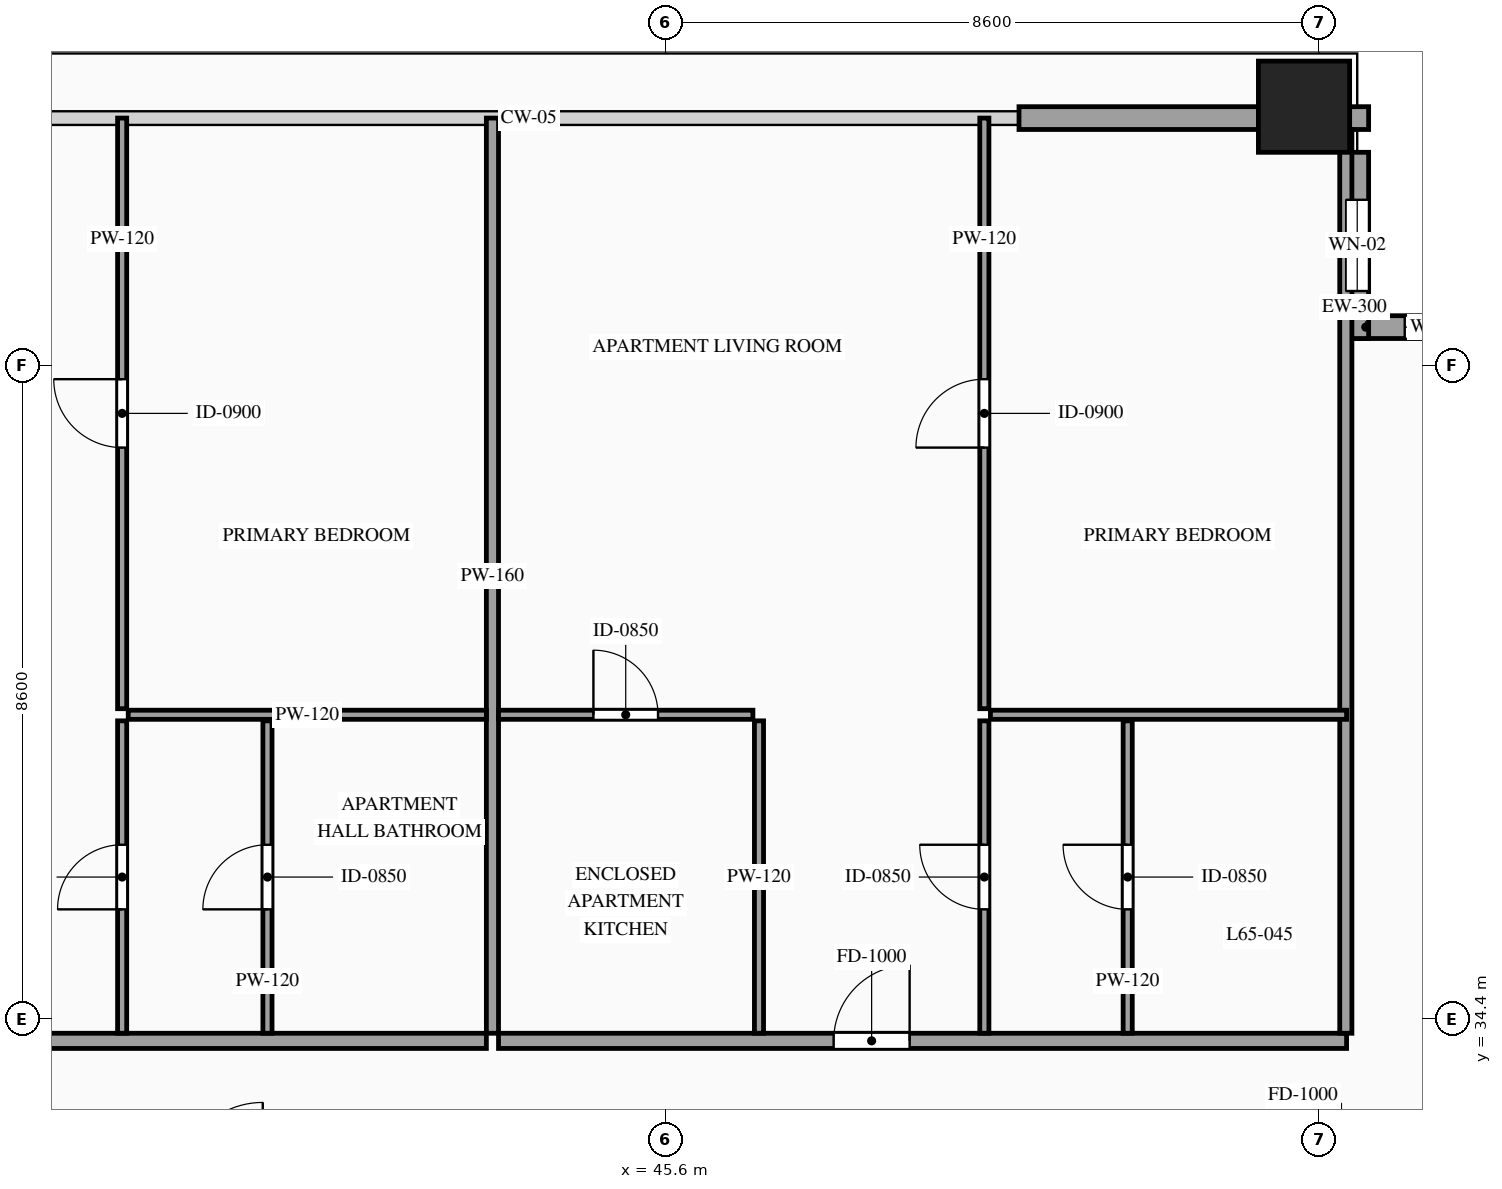
"""IFC4 building model, lengths in metres.
Left out: names, types, materials, properties, quantities, classifications, styles, units other than length and angle.
Written with IfcOpenShell. Run it as: python <this file> out.ifc"""

import sys

from ifc_helpers import new_model, si_unit, direction, frame, frame_2d, origin, origin_2d, place, context, subcontext, project, spatial, rectangle, hollow_rectangle, extrude, source, transform, mapped, element, fill, save


model = new_model("IFC4")
c1 = context("Model", 3, precision=1e-05, world=origin(), true_north=direction((0.0, 1.0)))
c2 = subcontext(c1, "Body", "Model", "MODEL_VIEW")
j1 = project(units=[si_unit("LENGTHUNIT", "METRE"), si_unit("PLANEANGLEUNIT", "RADIAN")], contexts=[c1])
p1 = place(None, origin())
s1 = spatial("IfcSite", under=j1, at=p1, CompositionType="ELEMENT")
p2 = place(p1, origin())
s2 = spatial("IfcBuilding", under=s1, at=p2, CompositionType="ELEMENT")
p3 = place(p2, frame((0.0, 0.0, 245.1)))
s3 = spatial("IfcBuildingStorey", under=s2, at=p3, CompositionType="ELEMENT", Elevation=245.1)
m1 = source(origin(), c2, "Body", "SweptSolid", [
    extrude(hollow_rectangle(XDim=1.2, YDim=1.2, WallThickness=0.055, at=origin_2d()), origin(), (0.0, 0.0, 1.0), 3.5),
])
p4 = place(p3, frame((54.0, 46.4, 0.0), z_axis=(0.0, 0.0, 1.0), x_axis=(1.0, 0.0, 0.0)))
e1 = element("IfcColumn", 1, at=p4, inside=s3, PredefinedType="COLUMN", context=c2, shape_type="MappedRepresentation", body=[
    mapped(m1, transform((0.0, 0.0, 0.0), scale=1.0)),
])
p5 = place(p3, frame((57.0, 43.5, 0.0), z_axis=(0.0, 0.0, 1.0), x_axis=(-1.0, 0.0, 0.0)))
e2 = element("IfcWall", 2, at=p5, inside=s3, PredefinedType="SOLIDWALL", context=c2, shape_type="SweptSolid", body=[
    extrude(rectangle(XDim=2.45, YDim=0.3, at=frame_2d((1.225, 0.0))), origin(), (0.0, 0.0, 1.0), 3.28),
])
p6 = place(p5, frame((0.775, 0.0, 0.85)))
e3 = element("IfcOpeningElement", 3, at=p6, cuts=e2, PredefinedType="OPENING", context=c2, shape_type="SweptSolid", body=[
    extrude(rectangle(XDim=0.9, YDim=1.5, at=frame_2d((0.45, 0.75))), frame((0.0, 0.165, 0.0), z_axis=(0.0, -1.0, 0.0), x_axis=(1.0, 0.0, 0.0)), (0.0, 0.0, 1.0), 0.33),
])
p7 = place(p3, frame((54.7, 43.35, 0.0), z_axis=(0.0, 0.0, 1.0), x_axis=(0.0, 1.0, 0.0)))
e4 = element("IfcWall", 4, at=p7, inside=s3, PredefinedType="SOLIDWALL", context=c2, shape_type="SweptSolid", body=[
    extrude(rectangle(XDim=2.45, YDim=0.3, at=frame_2d((1.225, 0.0))), origin(), (0.0, 0.0, 1.0), 3.28),
])
p8 = place(p7, frame((0.625, 0.0, 0.85)))
e5 = element("IfcOpeningElement", 5, at=p8, cuts=e4, PredefinedType="OPENING", context=c2, shape_type="SweptSolid", body=[
    extrude(rectangle(XDim=1.2, YDim=2.1, at=frame_2d((0.6, 1.05))), frame((0.0, 0.165, 0.0), z_axis=(0.0, -1.0, 0.0), x_axis=(1.0, 0.0, 0.0)), (0.0, 0.0, 1.0), 0.33),
])
m2 = source(origin(), c2, "Body", "SweptSolid", [
    extrude(rectangle(XDim=0.25, YDim=0.3, at=frame_2d((0.125, 0.0))), origin(), (0.0, 0.0, 1.0), 3.28),
])
p9 = place(p3, frame((54.6, 46.25, 0.0), z_axis=(0.0, 0.0, 1.0), x_axis=(1.0, 0.0, 0.0)))
e6 = element("IfcWall", 6, at=p9, inside=s3, PredefinedType="SOLIDWALL", context=c2, shape_type="MappedRepresentation", body=[
    mapped(m2, transform((0.0, 0.0, 0.0), scale=1.0)),
])
m3 = source(origin(), c2, "Body", "SweptSolid", [
    extrude(rectangle(XDim=3.15, YDim=0.3, at=frame_2d((1.575, 0.0))), origin(), (0.0, 0.0, 1.0), 2.835),
])
p10 = place(p3, frame((50.25, 46.25, 0.0), z_axis=(0.0, 0.0, 1.0), x_axis=(1.0, 0.0, 0.0)))
e7 = element("IfcWall", 7, at=p10, inside=s3, PredefinedType="SOLIDWALL", context=c2, shape_type="MappedRepresentation", body=[
    mapped(m3, transform((0.0, 0.0, 0.0), scale=1.0)),
])
p11 = place(p3, frame((31.461, 34.11, 0.0), z_axis=(0.0, 0.0, 1.0), x_axis=(1.0, 0.0, 0.0)))
e8 = element("IfcWall", 8, at=p11, inside=s3, PredefinedType="PARTITIONING", context=c2, shape_type="SweptSolid", body=[
    extrude(rectangle(XDim=11.781, YDim=0.2, at=frame_2d((5.891, 0.0))), origin(), (0.0, 0.0, 1.0), 3.28),
])
p12 = place(p11, frame((4.801, 0.0, 0.0)))
e9 = element("IfcOpeningElement", 9, at=p12, cuts=e8, PredefinedType="OPENING", context=c2, shape_type="SweptSolid", body=[
    extrude(rectangle(XDim=1.0, YDim=2.2, at=frame_2d((0.5, 1.1))), frame((0.0, 0.115, 0.0), z_axis=(0.0, -1.0, 0.0), x_axis=(1.0, 0.0, 0.0)), (0.0, 0.0, 1.0), 0.23),
])
m4 = source(origin(), c2, "Body", "SweptSolid", [
    extrude(rectangle(XDim=12.04, YDim=0.16, at=frame_2d((6.02, 0.0))), origin(), (0.0, 0.0, 1.0), 3.28),
])
p13 = place(p3, frame((43.322, 34.21, 0.0), z_axis=(0.0, 0.0, 1.0), x_axis=(0.0, 1.0, 0.0)))
e10 = element("IfcWall", 10, at=p13, inside=s3, PredefinedType="PARTITIONING", context=c2, shape_type="MappedRepresentation", body=[
    mapped(m4, transform((0.0, 0.0, 0.0), scale=1.0)),
])
p14 = place(p3, frame((40.362, 34.21, 0.0), z_axis=(0.0, 0.0, 1.0), x_axis=(0.0, 1.0, 0.0)))
e11 = element("IfcWall", 11, at=p14, inside=s3, PredefinedType="PARTITIONING", context=c2, shape_type="SweptSolid", body=[
    extrude(rectangle(XDim=4.11, YDim=0.12, at=frame_2d((2.055, 0.0))), origin(), (0.0, 0.0, 1.0), 3.28),
])
p15 = place(p14, frame((1.63, 0.0, 0.0)))
e12 = element("IfcOpeningElement", 12, at=p15, cuts=e11, PredefinedType="OPENING", context=c2, shape_type="SweptSolid", body=[
    extrude(rectangle(XDim=0.85, YDim=2.1, at=frame_2d((0.425, 1.05))), frame((0.0, 0.075, 0.0), z_axis=(0.0, -1.0, 0.0), x_axis=(1.0, 0.0, 0.0)), (0.0, 0.0, 1.0), 0.15),
])
m5 = source(origin(), c2, "Body", "SweptSolid", [
    extrude(rectangle(XDim=4.712, YDim=0.12, at=frame_2d((2.356, 0.0))), origin(), (0.0, 0.0, 1.0), 3.28),
])
p16 = place(p3, frame((38.53, 38.4, 0.0), z_axis=(0.0, 0.0, 1.0), x_axis=(1.0, 0.0, 0.0)))
e13 = element("IfcWall", 13, at=p16, inside=s3, PredefinedType="PARTITIONING", context=c2, shape_type="MappedRepresentation", body=[
    mapped(m5, transform((0.0, 0.0, 0.0), scale=1.0)),
])
p17 = place(p3, frame((38.45, 38.48, 0.0), z_axis=(0.0, 0.0, 1.0), x_axis=(0.0, 1.0, 0.0)))
e14 = element("IfcWall", 14, at=p17, inside=s3, PredefinedType="PARTITIONING", context=c2, shape_type="SweptSolid", body=[
    extrude(rectangle(XDim=7.77, YDim=0.12, at=frame_2d((3.885, 0.0))), origin(), (0.0, 0.0, 1.0), 3.28),
])
p18 = place(p17, frame((3.435, 0.0, 0.0)))
e15 = element("IfcOpeningElement", 15, at=p18, cuts=e14, PredefinedType="OPENING", context=c2, shape_type="SweptSolid", body=[
    extrude(rectangle(XDim=0.9, YDim=2.15, at=frame_2d((0.45, 1.075))), frame((0.0, 0.075, 0.0), z_axis=(0.0, -1.0, 0.0), x_axis=(1.0, 0.0, 0.0)), (0.0, 0.0, 1.0), 0.15),
])
p19 = place(p3, frame((38.45, 34.21, 0.0), z_axis=(0.0, 0.0, 1.0), x_axis=(0.0, 1.0, 0.0)))
e16 = element("IfcWall", 16, at=p19, inside=s3, PredefinedType="PARTITIONING", context=c2, shape_type="SweptSolid", body=[
    extrude(rectangle(XDim=4.11, YDim=0.12, at=frame_2d((2.055, 0.0))), origin(), (0.0, 0.0, 1.0), 3.28),
])
p20 = place(p19, frame((1.63, 0.0, 0.0)))
e17 = element("IfcOpeningElement", 17, at=p20, cuts=e16, PredefinedType="OPENING", context=c2, shape_type="SweptSolid", body=[
    extrude(rectangle(XDim=0.85, YDim=2.1, at=frame_2d((0.425, 1.05))), frame((0.0, 0.075, 0.0), z_axis=(0.0, -1.0, 0.0), x_axis=(1.0, 0.0, 0.0)), (0.0, 0.0, 1.0), 0.15),
])
p21 = place(p3, frame((43.402, 34.11, 0.0), z_axis=(0.0, 0.0, 1.0), x_axis=(1.0, 0.0, 0.0)))
e18 = element("IfcWall", 18, at=p21, inside=s3, PredefinedType="PARTITIONING", context=c2, shape_type="SweptSolid", body=[
    extrude(rectangle(XDim=11.158, YDim=0.2, at=frame_2d((5.579, 0.0))), origin(), (0.0, 0.0, 1.0), 3.28),
])
p22 = place(p21, frame((4.409, 0.0, 0.0)))
e19 = element("IfcOpeningElement", 19, at=p22, cuts=e18, PredefinedType="OPENING", context=c2, shape_type="SweptSolid", body=[
    extrude(rectangle(XDim=1.0, YDim=2.2, at=frame_2d((0.5, 1.1))), frame((0.0, 0.115, 0.0), z_axis=(0.0, -1.0, 0.0), x_axis=(1.0, 0.0, 0.0)), (0.0, 0.0, 1.0), 0.23),
])
m6 = source(origin(), c2, "Body", "SweptSolid", [
    extrude(rectangle(XDim=11.89, YDim=0.16, at=frame_2d((5.945, 0.0))), origin(), (0.0, 0.0, 1.0), 3.28),
])
p23 = place(p3, frame((54.55, 34.21, 0.0), z_axis=(0.0, 0.0, 1.0), x_axis=(0.0, 1.0, 0.0)))
e20 = element("IfcWall", 20, at=p23, inside=s3, PredefinedType="PARTITIONING", context=c2, shape_type="MappedRepresentation", body=[
    mapped(m6, transform((0.0, 0.0, 0.0), scale=1.0)),
])
p24 = place(p3, frame((43.402, 38.4, 0.0), z_axis=(0.0, 0.0, 1.0), x_axis=(1.0, 0.0, 0.0)))
e21 = element("IfcWall", 21, at=p24, inside=s3, PredefinedType="PARTITIONING", context=c2, shape_type="SweptSolid", body=[
    extrude(rectangle(XDim=3.347, YDim=0.12, at=frame_2d((1.673, 0.0))), origin(), (0.0, 0.0, 1.0), 3.28),
])
p25 = place(p24, frame((1.249, 0.0, 0.0)))
e22 = element("IfcOpeningElement", 22, at=p25, cuts=e21, PredefinedType="OPENING", context=c2, shape_type="SweptSolid", body=[
    extrude(rectangle(XDim=0.85, YDim=2.1, at=frame_2d((0.425, 1.05))), frame((0.0, 0.075, 0.0), z_axis=(0.0, -1.0, 0.0), x_axis=(1.0, 0.0, 0.0)), (0.0, 0.0, 1.0), 0.15),
])
m7 = source(origin(), c2, "Body", "SweptSolid", [
    extrude(rectangle(XDim=4.11, YDim=0.12, at=frame_2d((2.055, 0.0))), origin(), (0.0, 0.0, 1.0), 3.28),
])
p26 = place(p3, frame((46.829, 34.21, 0.0), z_axis=(0.0, 0.0, 1.0), x_axis=(0.0, 1.0, 0.0)))
e23 = element("IfcWall", 23, at=p26, inside=s3, PredefinedType="PARTITIONING", context=c2, shape_type="MappedRepresentation", body=[
    mapped(m7, transform((0.0, 0.0, 0.0), scale=1.0)),
])
p27 = place(p3, frame((51.68, 34.21, 0.0), z_axis=(0.0, 0.0, 1.0), x_axis=(0.0, 1.0, 0.0)))
e24 = element("IfcWall", 24, at=p27, inside=s3, PredefinedType="PARTITIONING", context=c2, shape_type="SweptSolid", body=[
    extrude(rectangle(XDim=4.11, YDim=0.12, at=frame_2d((2.055, 0.0))), origin(), (0.0, 0.0, 1.0), 3.28),
])
p28 = place(p27, frame((1.63, 0.0, 0.0)))
e25 = element("IfcOpeningElement", 25, at=p28, cuts=e24, PredefinedType="OPENING", context=c2, shape_type="SweptSolid", body=[
    extrude(rectangle(XDim=0.85, YDim=2.1, at=frame_2d((0.425, 1.05))), frame((0.0, 0.075, 0.0), z_axis=(0.0, -1.0, 0.0), x_axis=(1.0, 0.0, 0.0)), (0.0, 0.0, 1.0), 0.15),
])
m8 = source(origin(), c2, "Body", "SweptSolid", [
    extrude(rectangle(XDim=4.686, YDim=0.12, at=frame_2d((2.343, 0.0))), origin(), (0.0, 0.0, 1.0), 3.28),
])
p29 = place(p3, frame((49.874, 38.4, 0.0), z_axis=(0.0, 0.0, 1.0), x_axis=(1.0, 0.0, 0.0)))
e26 = element("IfcWall", 26, at=p29, inside=s3, PredefinedType="PARTITIONING", context=c2, shape_type="MappedRepresentation", body=[
    mapped(m8, transform((0.0, 0.0, 0.0), scale=1.0)),
])
p30 = place(p3, frame((49.794, 38.48, 0.0), z_axis=(0.0, 0.0, 1.0), x_axis=(0.0, 1.0, 0.0)))
e27 = element("IfcWall", 27, at=p30, inside=s3, PredefinedType="PARTITIONING", context=c2, shape_type="SweptSolid", body=[
    extrude(rectangle(XDim=7.77, YDim=0.12, at=frame_2d((3.885, 0.0))), origin(), (0.0, 0.0, 1.0), 3.28),
])
p31 = place(p30, frame((3.435, 0.0, 0.0)))
e28 = element("IfcOpeningElement", 28, at=p31, cuts=e27, PredefinedType="OPENING", context=c2, shape_type="SweptSolid", body=[
    extrude(rectangle(XDim=0.9, YDim=2.15, at=frame_2d((0.45, 1.075))), frame((0.0, 0.075, 0.0), z_axis=(0.0, -1.0, 0.0), x_axis=(1.0, 0.0, 0.0)), (0.0, 0.0, 1.0), 0.15),
])
p32 = place(p3, frame((49.794, 34.21, 0.0), z_axis=(0.0, 0.0, 1.0), x_axis=(0.0, 1.0, 0.0)))
e29 = element("IfcWall", 29, at=p32, inside=s3, PredefinedType="PARTITIONING", context=c2, shape_type="SweptSolid", body=[
    extrude(rectangle(XDim=4.11, YDim=0.12, at=frame_2d((2.055, 0.0))), origin(), (0.0, 0.0, 1.0), 3.28),
])
p33 = place(p32, frame((1.63, 0.0, 0.0)))
e30 = element("IfcOpeningElement", 30, at=p33, cuts=e29, PredefinedType="OPENING", context=c2, shape_type="SweptSolid", body=[
    extrude(rectangle(XDim=0.85, YDim=2.1, at=frame_2d((0.425, 1.05))), frame((0.0, 0.075, 0.0), z_axis=(0.0, -1.0, 0.0), x_axis=(1.0, 0.0, 0.0)), (0.0, 0.0, 1.0), 0.15),
])
m9 = source(origin(), c2, "Body", "SweptSolid", [
    extrude(rectangle(XDim=0.9, YDim=1.5, at=frame_2d((0.45, 0.75))), frame((0.0, 0.03, 0.0), z_axis=(0.0, -1.0, 0.0), x_axis=(1.0, 0.0, 0.0)), (0.0, 0.0, 1.0), 0.06),
])
p34 = place(p6, origin())
e31 = element("IfcWindow", 31, at=p34, inside=s3, PartitioningType="SINGLE_PANEL", PredefinedType="WINDOW", context=c2, shape_type="MappedRepresentation", body=[
    mapped(m9, transform((0.0, 0.0, 0.0), scale=1.0)),
])
fill(e3, e31)
m10 = source(origin(), c2, "Body", "SweptSolid", [
    extrude(rectangle(XDim=1.2, YDim=2.1, at=frame_2d((0.6, 1.05))), frame((0.0, 0.03, 0.0), z_axis=(0.0, -1.0, 0.0), x_axis=(1.0, 0.0, 0.0)), (0.0, 0.0, 1.0), 0.06),
])
p35 = place(p8, origin())
e32 = element("IfcWindow", 32, at=p35, inside=s3, PartitioningType="SINGLE_PANEL", PredefinedType="WINDOW", context=c2, shape_type="MappedRepresentation", body=[
    mapped(m10, transform((0.0, 0.0, 0.0), scale=1.0)),
])
fill(e5, e32)
m11 = source(origin(), c2, "Body", "SweptSolid", [
    extrude(rectangle(XDim=0.85, YDim=2.1, at=frame_2d((0.425, 1.05))), frame((0.0, 0.025, 0.0), z_axis=(0.0, -1.0, 0.0), x_axis=(1.0, 0.0, 0.0)), (0.0, 0.0, 1.0), 0.05),
])
p36 = place(p15, origin())
e33 = element("IfcDoor", 33, at=p36, inside=s3, OperationType="SINGLE_SWING_LEFT", PredefinedType="DOOR", context=c2, shape_type="MappedRepresentation", body=[
    mapped(m11, transform((0.0, 0.0, 0.0), scale=1.0)),
])
fill(e12, e33)
m12 = source(origin(), c2, "Body", "SweptSolid", [
    extrude(rectangle(XDim=0.9, YDim=2.15, at=frame_2d((0.45, 1.075))), frame((0.0, 0.025, 0.0), z_axis=(0.0, -1.0, 0.0), x_axis=(1.0, 0.0, 0.0)), (0.0, 0.0, 1.0), 0.05),
])
p37 = place(p18, origin())
e34 = element("IfcDoor", 34, at=p37, inside=s3, OperationType="SINGLE_SWING_RIGHT", PredefinedType="DOOR", context=c2, shape_type="MappedRepresentation", body=[
    mapped(m12, transform((0.0, 0.0, 0.0), scale=1.0)),
])
fill(e15, e34)
p38 = place(p20, origin())
e35 = element("IfcDoor", 35, at=p38, inside=s3, OperationType="SINGLE_SWING_LEFT", PredefinedType="DOOR", context=c2, shape_type="MappedRepresentation", body=[
    mapped(m11, transform((0.0, 0.0, 0.0), scale=1.0)),
])
fill(e17, e35)
m13 = source(origin(), c2, "Body", "SweptSolid", [
    extrude(rectangle(XDim=1.0, YDim=2.2, at=frame_2d((0.5, 1.1))), frame((0.0, 0.025, 0.0), z_axis=(0.0, -1.0, 0.0), x_axis=(1.0, 0.0, 0.0)), (0.0, 0.0, 1.0), 0.05),
])
p39 = place(p22, origin())
e36 = element("IfcDoor", 36, at=p39, inside=s3, OperationType="SINGLE_SWING_RIGHT", PredefinedType="DOOR", context=c2, shape_type="MappedRepresentation", body=[
    mapped(m13, transform((0.0, 0.0, 0.0), scale=1.0)),
])
fill(e19, e36)
p40 = place(p25, origin())
e37 = element("IfcDoor", 37, at=p40, inside=s3, OperationType="SINGLE_SWING_LEFT", PredefinedType="DOOR", context=c2, shape_type="MappedRepresentation", body=[
    mapped(m11, transform((0.0, 0.0, 0.0), scale=1.0)),
])
fill(e22, e37)
p41 = place(p28, origin())
e38 = element("IfcDoor", 38, at=p41, inside=s3, OperationType="SINGLE_SWING_RIGHT", PredefinedType="DOOR", context=c2, shape_type="MappedRepresentation", body=[
    mapped(m11, transform((0.0, 0.0, 0.0), scale=1.0)),
])
fill(e25, e38)
p42 = place(p31, origin())
e39 = element("IfcDoor", 39, at=p42, inside=s3, OperationType="SINGLE_SWING_LEFT", PredefinedType="DOOR", context=c2, shape_type="MappedRepresentation", body=[
    mapped(m12, transform((0.0, 0.0, 0.0), scale=1.0)),
])
fill(e28, e39)
p43 = place(p33, origin())
e40 = element("IfcDoor", 40, at=p43, inside=s3, OperationType="SINGLE_SWING_RIGHT", PredefinedType="DOOR", context=c2, shape_type="MappedRepresentation", body=[
    mapped(m11, transform((0.0, 0.0, 0.0), scale=1.0)),
])
fill(e30, e40)
save(model, sys.argv[1])
